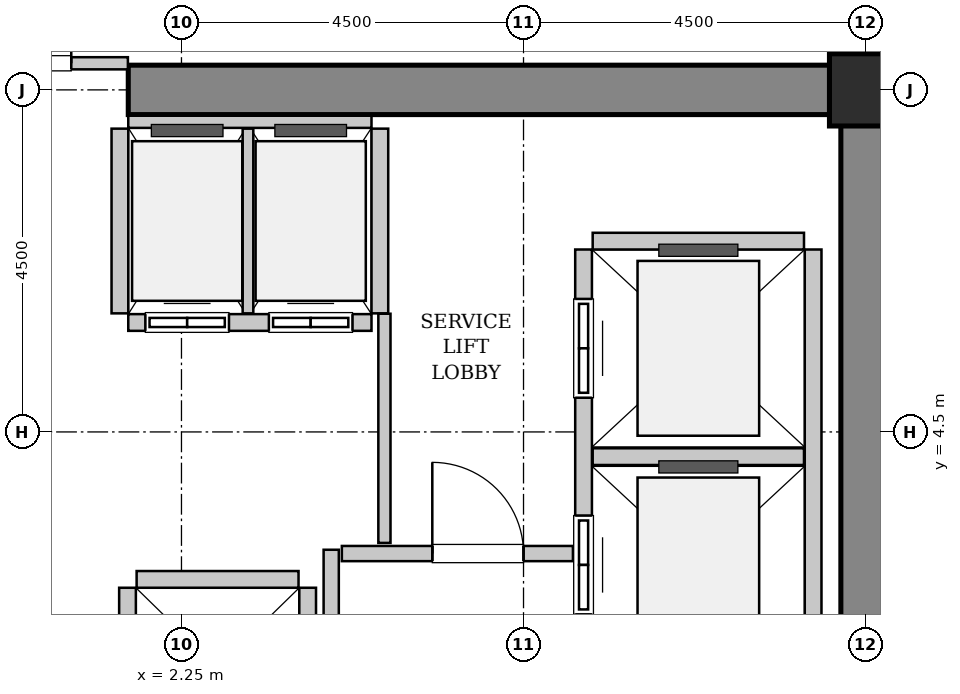
"""IFC4 building model, lengths in metres.
Left out: names, types, materials, properties, quantities, classifications, styles, units other than length and angle.
Written with IfcOpenShell. Run it as: python <this file> out.ifc"""

import sys

from ifc_helpers import new_model, si_unit, direction, frame, frame_2d, origin, origin_2d, place, context, subcontext, project, spatial, rectangle, hollow_rectangle, extrude, source, transform, mapped, element, fill, save


model = new_model("IFC4")
c1 = context("Model", 3, precision=1e-05, world=origin(), true_north=direction((0.0, 1.0)))
c2 = subcontext(c1, "Body", "Model", "MODEL_VIEW")
j1 = project(units=[si_unit("LENGTHUNIT", "METRE"), si_unit("PLANEANGLEUNIT", "RADIAN")], contexts=[c1])
p1 = place(None, origin())
s1 = spatial("IfcSite", under=j1, at=p1, CompositionType="ELEMENT")
p2 = place(p1, origin())
s2 = spatial("IfcBuilding", under=s1, at=p2, CompositionType="ELEMENT")
p3 = place(p2, frame((0.0, 0.0, 33.0)))
s3 = spatial("IfcBuildingStorey", under=s2, at=p3, CompositionType="ELEMENT", Elevation=33.0)
m1 = source(origin(), c2, "Body", "SweptSolid", [
    extrude(rectangle(XDim=10.025, YDim=0.65, at=frame_2d((5.012, 0.0))), origin(), (0.0, 0.0, 1.0), 3.8),
])
p4 = place(p3, frame((1.55, 9.0, 0.0), z_axis=(0.0, 0.0, 1.0), x_axis=(1.0, 0.0, 0.0)))
e1 = element("IfcWall", 1, at=p4, inside=s3, PredefinedType="SHEAR", context=c2, shape_type="MappedRepresentation", body=[
    mapped(m1, transform((0.0, 0.0, 0.0), x_axis=(1.0, 0.0, 0.0), y_axis=(0.0, 1.0, 0.0), z_axis=(0.0, 0.0, 1.0), scale=1.0)),
])
m2 = source(origin(), c2, "Body", "SweptSolid", [
    extrude(rectangle(XDim=7.325, YDim=0.65, at=frame_2d((3.663, 0.0))), origin(), (0.0, 0.0, 1.0), 3.8),
])
p5 = place(p3, frame((11.25, 1.35, 0.0), z_axis=(0.0, 0.0, 1.0), x_axis=(0.0, 1.0, 0.0)))
e2 = element("IfcWall", 2, at=p5, inside=s3, PredefinedType="SHEAR", context=c2, shape_type="MappedRepresentation", body=[
    mapped(m2, transform((0.0, 0.0, 0.0), x_axis=(1.0, 0.0, 0.0), y_axis=(0.0, 1.0, 0.0), z_axis=(0.0, 0.0, 1.0), scale=1.0)),
])
m3 = source(origin(), c2, "Body", "SweptSolid", [
    extrude(hollow_rectangle(XDim=0.95, YDim=0.95, WallThickness=0.045, InnerFilletRadius=0.045, OuterFilletRadius=0.09, at=origin_2d()), origin(), (0.0, 0.0, 1.0), 3.8),
])
p6 = place(p3, frame((11.25, 9.0, 0.0), z_axis=(0.0, 0.0, 1.0), x_axis=(1.0, 0.0, 0.0)))
e3 = element("IfcColumn", 3, at=p6, inside=s3, PredefinedType="COLUMN", context=c2, shape_type="MappedRepresentation", body=[
    mapped(m3, transform((0.0, 0.0, 0.0), x_axis=(1.0, 0.0, 0.0), y_axis=(0.0, 1.0, 0.0), z_axis=(0.0, 0.0, 1.0), scale=1.0)),
])
m4 = source(origin(), c2, "Body", "SweptSolid", [
    extrude(rectangle(XDim=5.45, YDim=0.22, at=frame_2d((2.725, 0.0))), origin(), (0.0, 0.0, 1.0), 3.535),
])
p7 = place(p3, frame((7.54, 6.9, 0.0), z_axis=(0.0, 0.0, 1.0), x_axis=(0.0, -1.0, 0.0)))
e4 = element("IfcWall", 4, at=p7, inside=s3, PredefinedType="SOLIDWALL", context=c2, shape_type="MappedRepresentation", body=[
    mapped(m4, transform((0.0, 0.0, 0.0), x_axis=(1.0, 0.0, 0.0), y_axis=(0.0, 1.0, 0.0), z_axis=(0.0, 0.0, 1.0), scale=1.0)),
])
p8 = place(p7, frame((3.5, 0.0, 0.0)))
e5 = element("IfcOpeningElement", 5, at=p8, cuts=e4, PredefinedType="OPENING", context=c2, shape_type="SweptSolid", body=[
    extrude(rectangle(XDim=1.3, YDim=2.3, at=frame_2d((0.65, 1.15))), frame((0.0, 0.12, 0.0), z_axis=(0.0, -1.0, 0.0), x_axis=(1.0, 0.0, 0.0)), (0.0, 0.0, 1.0), 0.24),
])
p9 = place(p7, frame((0.65, 0.0, 0.0)))
e6 = element("IfcOpeningElement", 6, at=p9, cuts=e4, PredefinedType="OPENING", context=c2, shape_type="SweptSolid", body=[
    extrude(rectangle(XDim=1.3, YDim=2.3, at=frame_2d((0.65, 1.15))), frame((0.0, 0.12, 0.0), z_axis=(0.0, -1.0, 0.0), x_axis=(1.0, 0.0, 0.0)), (0.0, 0.0, 1.0), 0.24),
])
p10 = place(p3, frame((10.56, 1.45, 0.0), z_axis=(0.0, 0.0, 1.0), x_axis=(0.0, 1.0, 0.0)))
e7 = element("IfcWall", 7, at=p10, inside=s3, PredefinedType="SOLIDWALL", context=c2, shape_type="MappedRepresentation", body=[
    mapped(m4, transform((0.0, 0.0, 0.0), x_axis=(1.0, 0.0, 0.0), y_axis=(0.0, 1.0, 0.0), z_axis=(0.0, 0.0, 1.0), scale=1.0)),
])
m5 = source(origin(), c2, "Body", "SweptSolid", [
    extrude(rectangle(XDim=2.78, YDim=0.22, at=frame_2d((1.39, 0.0))), origin(), (0.0, 0.0, 1.0), 3.535),
])
for number, where, z_axis, x_axis in (
    (8, (7.66, 4.175, 0.0), (0.0, 0.0, 1.0), (1.0, 0.0, 0.0)),
    (9, (10.44, 7.01, 0.0), (0.0, 0.0, 1.0), (-1.0, 0.0, 0.0)),
):
    element("IfcWall", number, at=place(p3, frame(where, z_axis=z_axis, x_axis=x_axis)), inside=s3, PredefinedType="SOLIDWALL", context=c2, shape_type="MappedRepresentation", body=[
        mapped(m5, transform((0.0, 0.0, 0.0), x_axis=(1.0, 0.0, 0.0), y_axis=(0.0, 1.0, 0.0), z_axis=(0.0, 0.0, 1.0), scale=1.0)),
    ])
m6 = source(origin(), c2, "Body", "SweptSolid", [
    extrude(rectangle(XDim=3.2, YDim=0.22, at=frame_2d((1.6, 0.0))), origin(), (0.0, 0.0, 1.0), 3.535),
])
p11 = place(p3, frame((1.55, 5.94, 0.0), z_axis=(0.0, 0.0, 1.0), x_axis=(1.0, 0.0, 0.0)))
e10 = element("IfcWall", 10, at=p11, inside=s3, PredefinedType="SOLIDWALL", context=c2, shape_type="MappedRepresentation", body=[
    mapped(m6, transform((0.0, 0.0, 0.0), x_axis=(1.0, 0.0, 0.0), y_axis=(0.0, 1.0, 0.0), z_axis=(0.0, 0.0, 1.0), scale=1.0)),
])
p12 = place(p11, frame((0.225, 0.0, 0.0)))
e11 = element("IfcOpeningElement", 11, at=p12, cuts=e10, PredefinedType="OPENING", context=c2, shape_type="SweptSolid", body=[
    extrude(rectangle(XDim=1.1, YDim=2.2, at=frame_2d((0.55, 1.1))), frame((0.0, 0.12, 0.0), z_axis=(0.0, -1.0, 0.0), x_axis=(1.0, 0.0, 0.0)), (0.0, 0.0, 1.0), 0.24),
])
p13 = place(p11, frame((1.85, 0.0, 0.0)))
e12 = element("IfcOpeningElement", 12, at=p13, cuts=e10, PredefinedType="OPENING", context=c2, shape_type="SweptSolid", body=[
    extrude(rectangle(XDim=1.1, YDim=2.2, at=frame_2d((0.55, 1.1))), frame((0.0, 0.12, 0.0), z_axis=(0.0, -1.0, 0.0), x_axis=(1.0, 0.0, 0.0)), (0.0, 0.0, 1.0), 0.24),
])
m7 = source(origin(), c2, "Body", "SweptSolid", [
    extrude(rectangle(XDim=3.2, YDim=0.16, at=frame_2d((1.6, 0.0))), origin(), (0.0, 0.0, 1.0), 2.425),
])
p14 = place(p3, frame((4.75, 8.58, 0.0), z_axis=(0.0, 0.0, 1.0), x_axis=(-1.0, 0.0, 0.0)))
e13 = element("IfcWall", 13, at=p14, inside=s3, PredefinedType="PARTITIONING", context=c2, shape_type="MappedRepresentation", body=[
    mapped(m7, transform((0.0, 0.0, 0.0), x_axis=(1.0, 0.0, 0.0), y_axis=(0.0, 1.0, 0.0), z_axis=(0.0, 0.0, 1.0), scale=1.0)),
])
m8 = source(origin(), c2, "Body", "SweptSolid", [
    extrude(rectangle(XDim=2.43, YDim=0.22, at=frame_2d((1.215, 0.0))), origin(), (0.0, 0.0, 1.0), 3.535),
])
p15 = place(p3, frame((1.44, 8.49, 0.0), z_axis=(0.0, 0.0, 1.0), x_axis=(0.0, -1.0, 0.0)))
e14 = element("IfcWall", 14, at=p15, inside=s3, PredefinedType="SOLIDWALL", context=c2, shape_type="MappedRepresentation", body=[
    mapped(m8, transform((0.0, 0.0, 0.0), x_axis=(1.0, 0.0, 0.0), y_axis=(0.0, 1.0, 0.0), z_axis=(0.0, 0.0, 1.0), scale=1.0)),
])
m9 = source(origin(), c2, "Body", "SweptSolid", [
    extrude(rectangle(XDim=2.43, YDim=0.14, at=frame_2d((1.215, 0.0))), origin(), (0.0, 0.0, 1.0), 3.535),
])
p16 = place(p3, frame((3.125, 6.06, 0.0), z_axis=(0.0, 0.0, 1.0), x_axis=(0.0, 1.0, 0.0)))
e15 = element("IfcWall", 15, at=p16, inside=s3, PredefinedType="PARTITIONING", context=c2, shape_type="MappedRepresentation", body=[
    mapped(m9, transform((0.0, 0.0, 0.0), x_axis=(1.0, 0.0, 0.0), y_axis=(0.0, 1.0, 0.0), z_axis=(0.0, 0.0, 1.0), scale=1.0)),
])
p17 = place(p3, frame((4.86, 6.06, 0.0), z_axis=(0.0, 0.0, 1.0), x_axis=(0.0, 1.0, 0.0)))
e16 = element("IfcWall", 16, at=p17, inside=s3, PredefinedType="SOLIDWALL", context=c2, shape_type="MappedRepresentation", body=[
    mapped(m8, transform((0.0, 0.0, 0.0), x_axis=(1.0, 0.0, 0.0), y_axis=(0.0, 1.0, 0.0), z_axis=(0.0, 0.0, 1.0), scale=1.0)),
])
m10 = source(origin(), c2, "Body", "SweptSolid", [
    extrude(rectangle(XDim=4.9, YDim=0.22, at=frame_2d((2.45, 0.0))), origin(), (0.0, 0.0, 1.0), 3.535),
])
for number, where, z_axis, x_axis in (
    (17, (1.54, 2.45, 0.0), (0.0, 0.0, 1.0), (0.0, -1.0, 0.0)),
    (18, (3.91, -2.45, 0.0), (0.0, 0.0, 1.0), (0.0, 1.0, 0.0)),
):
    element("IfcWall", number, at=place(p3, frame(where, z_axis=z_axis, x_axis=x_axis)), inside=s3, PredefinedType="SOLIDWALL", context=c2, shape_type="MappedRepresentation", body=[
        mapped(m10, transform((0.0, 0.0, 0.0), x_axis=(1.0, 0.0, 0.0), y_axis=(0.0, 1.0, 0.0), z_axis=(0.0, 0.0, 1.0), scale=1.0)),
    ])
m11 = source(origin(), c2, "Body", "SweptSolid", [
    extrude(rectangle(XDim=2.13, YDim=0.22, at=frame_2d((1.065, 0.0))), origin(), (0.0, 0.0, 1.0), 3.535),
])
p18 = place(p3, frame((3.79, 2.56, 0.0), z_axis=(0.0, 0.0, 1.0), x_axis=(-1.0, 0.0, 0.0)))
e19 = element("IfcWall", 19, at=p18, inside=s3, PredefinedType="SOLIDWALL", context=c2, shape_type="MappedRepresentation", body=[
    mapped(m11, transform((0.0, 0.0, 0.0), x_axis=(1.0, 0.0, 0.0), y_axis=(0.0, 1.0, 0.0), z_axis=(0.0, 0.0, 1.0), scale=1.0)),
])
m12 = source(origin(), c2, "Body", "SweptSolid", [
    extrude(rectangle(XDim=5.9, YDim=0.2, at=frame_2d((2.95, 0.0))), origin(), (0.0, 0.0, 1.0), 3.535),
])
p19 = place(p3, frame((4.22, -2.95, 0.0), z_axis=(0.0, 0.0, 1.0), x_axis=(0.0, 1.0, 0.0)))
e20 = element("IfcWall", 20, at=p19, inside=s3, PredefinedType="PARTITIONING", context=c2, shape_type="MappedRepresentation", body=[
    mapped(m12, transform((0.0, 0.0, 0.0), x_axis=(1.0, 0.0, 0.0), y_axis=(0.0, 1.0, 0.0), z_axis=(0.0, 0.0, 1.0), scale=1.0)),
])
m13 = source(origin(), c2, "Body", "SweptSolid", [
    extrude(rectangle(XDim=3.04, YDim=0.2, at=frame_2d((1.52, 0.0))), origin(), (0.0, 0.0, 1.0), 3.535),
])
p20 = place(p3, frame((4.36, 2.9, 0.0), z_axis=(0.0, 0.0, 1.0), x_axis=(1.0, 0.0, 0.0)))
e21 = element("IfcWall", 21, at=p20, inside=s3, PredefinedType="PARTITIONING", context=c2, shape_type="MappedRepresentation", body=[
    mapped(m13, transform((0.0, 0.0, 0.0), x_axis=(1.0, 0.0, 0.0), y_axis=(0.0, 1.0, 0.0), z_axis=(0.0, 0.0, 1.0), scale=1.0)),
])
p21 = place(p20, frame((1.19, 0.0, 0.0)))
e22 = element("IfcOpeningElement", 22, at=p21, cuts=e21, PredefinedType="OPENING", context=c2, shape_type="SweptSolid", body=[
    extrude(rectangle(XDim=1.2, YDim=2.15, at=frame_2d((0.6, 1.075))), frame((0.0, 0.11, 0.0), z_axis=(0.0, -1.0, 0.0), x_axis=(1.0, 0.0, 0.0)), (0.0, 0.0, 1.0), 0.22),
])
m14 = source(origin(), c2, "Body", "SweptSolid", [
    extrude(rectangle(XDim=3.09, YDim=0.16, at=frame_2d((1.545, 0.0))), origin(), (0.0, 0.0, 1.0), 2.425),
])
p22 = place(p3, frame((-1.545, 9.35, 0.0), z_axis=(0.0, 0.0, 1.0), x_axis=(1.0, 0.0, 0.0)))
e23 = element("IfcWall", 23, at=p22, inside=s3, PredefinedType="PARTITIONING", context=c2, shape_type="MappedRepresentation", body=[
    mapped(m14, transform((0.0, 0.0, 0.0), x_axis=(1.0, 0.0, 0.0), y_axis=(0.0, 1.0, 0.0), z_axis=(0.0, 0.0, 1.0), scale=1.0)),
])
p23 = place(p22, frame((0.745, 0.0, 0.0)))
e24 = element("IfcOpeningElement", 24, at=p23, cuts=e23, PredefinedType="OPENING", context=c2, shape_type="SweptSolid", body=[
    extrude(rectangle(XDim=1.6, YDim=2.3, at=frame_2d((0.8, 1.15))), frame((0.0, 0.09, 0.0), z_axis=(0.0, -1.0, 0.0), x_axis=(1.0, 0.0, 0.0)), (0.0, 0.0, 1.0), 0.18),
])
m15 = source(origin(), c2, "Body", "SweptSolid", [
    extrude(rectangle(XDim=3.015, YDim=0.16, at=frame_2d((1.507, 0.0))), origin(), (0.0, 0.0, 1.0), 3.535),
])
p24 = place(p3, frame((4.92, 3.04, 0.0), z_axis=(0.0, 0.0, 1.0), x_axis=(0.0, 1.0, 0.0)))
e25 = element("IfcWall", 25, at=p24, inside=s3, PredefinedType="PARTITIONING", context=c2, shape_type="MappedRepresentation", body=[
    mapped(m15, transform((0.0, 0.0, 0.0), x_axis=(1.0, 0.0, 0.0), y_axis=(0.0, 1.0, 0.0), z_axis=(0.0, 0.0, 1.0), scale=1.0)),
])
m16 = source(origin(), c2, "Body", "SweptSolid", [
    extrude(rectangle(XDim=1.3, YDim=2.3, at=frame_2d((0.65, 1.15))), frame((0.0, 0.025, 0.0), z_axis=(0.0, -1.0, 0.0), x_axis=(1.0, 0.0, 0.0)), (0.0, 0.0, 1.0), 0.05),
])
p25 = place(p8, origin())
e26 = element("IfcDoor", 26, at=p25, inside=s3, OperationType="SLIDING_TO_RIGHT", PredefinedType="DOOR", context=c2, shape_type="MappedRepresentation", body=[
    mapped(m16, transform((0.0, 0.0, 0.0), x_axis=(1.0, 0.0, 0.0), y_axis=(0.0, 1.0, 0.0), z_axis=(0.0, 0.0, 1.0), scale=1.0)),
])
fill(e5, e26)
p26 = place(p9, origin())
e27 = element("IfcDoor", 27, at=p26, inside=s3, OperationType="SLIDING_TO_RIGHT", PredefinedType="DOOR", context=c2, shape_type="MappedRepresentation", body=[
    mapped(m16, transform((0.0, 0.0, 0.0), x_axis=(1.0, 0.0, 0.0), y_axis=(0.0, 1.0, 0.0), z_axis=(0.0, 0.0, 1.0), scale=1.0)),
])
fill(e6, e27)
m17 = source(origin(), c2, "Body", "SweptSolid", [
    extrude(rectangle(XDim=1.1, YDim=2.2, at=frame_2d((0.55, 1.1))), frame((0.0, 0.025, 0.0), z_axis=(0.0, -1.0, 0.0), x_axis=(1.0, 0.0, 0.0)), (0.0, 0.0, 1.0), 0.05),
])
p27 = place(p12, origin())
e28 = element("IfcDoor", 28, at=p27, inside=s3, OperationType="DOUBLE_DOOR_SLIDING", PredefinedType="DOOR", context=c2, shape_type="MappedRepresentation", body=[
    mapped(m17, transform((0.0, 0.0, 0.0), x_axis=(1.0, 0.0, 0.0), y_axis=(0.0, 1.0, 0.0), z_axis=(0.0, 0.0, 1.0), scale=1.0)),
])
fill(e11, e28)
p28 = place(p13, origin())
e29 = element("IfcDoor", 29, at=p28, inside=s3, OperationType="DOUBLE_DOOR_SLIDING", PredefinedType="DOOR", context=c2, shape_type="MappedRepresentation", body=[
    mapped(m17, transform((0.0, 0.0, 0.0), x_axis=(1.0, 0.0, 0.0), y_axis=(0.0, 1.0, 0.0), z_axis=(0.0, 0.0, 1.0), scale=1.0)),
])
fill(e12, e29)
m18 = source(origin(), c2, "Body", "SweptSolid", [
    extrude(rectangle(XDim=1.2, YDim=2.15, at=frame_2d((0.6, 1.075))), frame((0.0, 0.025, 0.0), z_axis=(0.0, -1.0, 0.0), x_axis=(1.0, 0.0, 0.0)), (0.0, 0.0, 1.0), 0.05),
])
p29 = place(p21, origin())
e30 = element("IfcDoor", 30, at=p29, inside=s3, OperationType="SINGLE_SWING_LEFT", PredefinedType="DOOR", context=c2, shape_type="MappedRepresentation", body=[
    mapped(m18, transform((0.0, 0.0, 0.0), x_axis=(1.0, 0.0, 0.0), y_axis=(0.0, 1.0, 0.0), z_axis=(0.0, 0.0, 1.0), scale=1.0)),
])
fill(e22, e30)
m19 = source(origin(), c2, "Body", "SweptSolid", [
    extrude(rectangle(XDim=1.6, YDim=2.3, at=frame_2d((0.8, 1.15))), frame((0.0, 0.025, 0.0), z_axis=(0.0, -1.0, 0.0), x_axis=(1.0, 0.0, 0.0)), (0.0, 0.0, 1.0), 0.05),
])
p30 = place(p23, origin())
e31 = element("IfcDoor", 31, at=p30, inside=s3, OperationType="DOUBLE_DOOR_SINGLE_SWING", PredefinedType="DOOR", context=c2, shape_type="MappedRepresentation", body=[
    mapped(m19, transform((0.0, 0.0, 0.0), x_axis=(1.0, 0.0, 0.0), y_axis=(0.0, 1.0, 0.0), z_axis=(0.0, 0.0, 1.0), scale=1.0)),
])
fill(e24, e31)
save(model, sys.argv[1])
